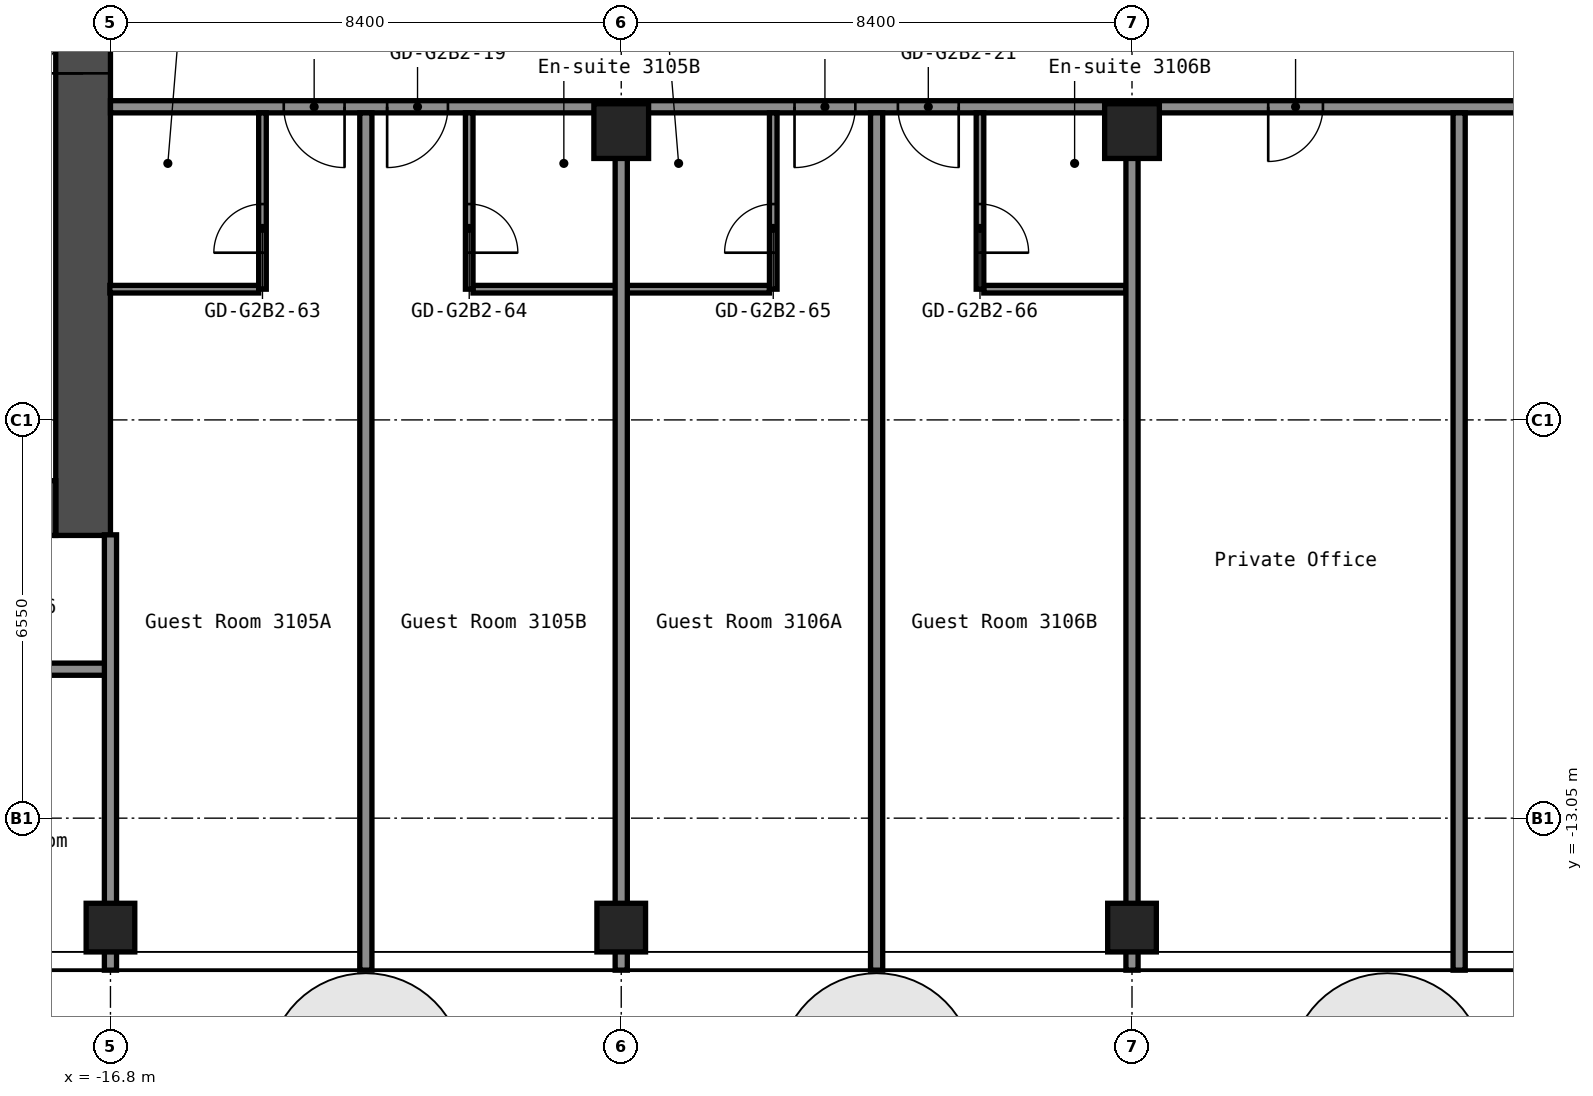
"""IFC4 building model, lengths in metres.
Left out: names, types, materials, properties, quantities, classifications, styles, units other than length and angle.
Written with IfcOpenShell. Run it as: python <this file> out.ifc"""

import sys

from ifc_helpers import new_model, si_unit, direction, frame, frame_2d, origin, origin_2d, place, context, subcontext, project, spatial, rectangle, hollow_rectangle, extrude, element, fill, save


model = new_model("IFC4")
c1 = context("Model", 3, precision=1e-05, world=origin(), true_north=direction((0.0, 1.0)))
c2 = subcontext(c1, "Body", "Model", "MODEL_VIEW")
j1 = project(units=[si_unit("LENGTHUNIT", "METRE"), si_unit("PLANEANGLEUNIT", "RADIAN")], contexts=[c1])
p1 = place(None, origin())
s1 = spatial("IfcSite", under=j1, at=p1, CompositionType="ELEMENT")
p2 = place(p1, origin())
s2 = spatial("IfcBuilding", under=s1, at=p2, CompositionType="ELEMENT")
p3 = place(p2, frame((0.0, 0.0, 110.6)))
s3 = spatial("IfcBuildingStorey", under=s2, at=p3, CompositionType="ELEMENT", Elevation=110.6)
for number, where, z_axis, x_axis in (
    (1, (-16.8, -14.85, 0.0), (0.0, 0.0, 1.0), (1.0, 0.0, 0.0)),
    (2, (-8.4, -14.85, 0.0), (0.0, 0.0, 1.0), (1.0, 0.0, 0.0)),
):
    element("IfcColumn", number, at=place(p3, frame(where, z_axis=z_axis, x_axis=x_axis)), inside=s3, PredefinedType="COLUMN", context=c2, shape_type="SweptSolid", body=[
        extrude(hollow_rectangle(XDim=0.8, YDim=0.8, WallThickness=0.032, at=origin_2d()), origin(), (0.0, 0.0, 1.0), 2.8),
    ])
p4 = place(p3, frame((-8.4, -1.75, 0.0), z_axis=(0.0, 0.0, 1.0), x_axis=(1.0, 0.0, 0.0)))
e3 = element("IfcColumn", 3, at=p4, inside=s3, PredefinedType="COLUMN", context=c2, shape_type="SweptSolid", body=[
    extrude(hollow_rectangle(XDim=0.9, YDim=0.9, WallThickness=0.036, at=origin_2d()), origin(), (0.0, 0.0, 1.0), 2.8),
])
p5 = place(p3, frame((0.0, -14.85, 0.0), z_axis=(0.0, 0.0, 1.0), x_axis=(1.0, 0.0, 0.0)))
e4 = element("IfcColumn", 4, at=p5, inside=s3, PredefinedType="COLUMN", context=c2, shape_type="SweptSolid", body=[
    extrude(hollow_rectangle(XDim=0.8, YDim=0.8, WallThickness=0.032, at=origin_2d()), origin(), (0.0, 0.0, 1.0), 2.8),
])
p6 = place(p3, frame((0.0, -1.75, 0.0), z_axis=(0.0, 0.0, 1.0), x_axis=(1.0, 0.0, 0.0)))
e5 = element("IfcColumn", 5, at=p6, inside=s3, PredefinedType="COLUMN", context=c2, shape_type="SweptSolid", body=[
    extrude(hollow_rectangle(XDim=0.9, YDim=0.9, WallThickness=0.036, at=origin_2d()), origin(), (0.0, 0.0, 1.0), 2.8),
])
p7 = place(p3, frame((-17.25, -8.4, 0.0), z_axis=(0.0, 0.0, 1.0), x_axis=(0.0, 1.0, 0.0)))
e6 = element("IfcWall", 6, at=p7, inside=s3, PredefinedType="SHEAR", context=c2, shape_type="SweptSolid", body=[
    extrude(rectangle(XDim=16.8, YDim=0.9, at=frame_2d((8.4, 0.0))), origin(), (0.0, 0.0, 1.0), 2.8),
])
p8 = place(p7, frame((7.6, 0.0, 0.0)))
e7 = element("IfcOpeningElement", 7, at=p8, cuts=e6, PredefinedType="OPENING", context=c2, shape_type="SweptSolid", body=[
    extrude(rectangle(XDim=1.2, YDim=2.1, at=frame_2d((0.6, 1.05))), frame((0.0, 0.46, 0.0), z_axis=(0.0, -1.0, 0.0), x_axis=(1.0, 0.0, 0.0)), (0.0, 0.0, 1.0), 0.92),
])
p9 = place(p3, frame((-32.7, -7.95, 0.0), z_axis=(0.0, 0.0, 1.0), x_axis=(1.0, 0.0, 0.0)))
e8 = element("IfcWall", 8, at=p9, inside=s3, PredefinedType="SHEAR", context=c2, shape_type="SweptSolid", body=[
    extrude(rectangle(XDim=15.0, YDim=0.9, at=frame_2d((7.5, 0.0))), origin(), (0.0, 0.0, 1.0), 2.8),
])
p10 = place(p9, frame((11.45, 0.0, 0.0)))
e9 = element("IfcOpeningElement", 9, at=p10, cuts=e8, PredefinedType="OPENING", context=c2, shape_type="SweptSolid", body=[
    extrude(rectangle(XDim=1.0, YDim=2.1, at=frame_2d((0.5, 1.05))), frame((0.0, 0.46, 0.0), z_axis=(0.0, -1.0, 0.0), x_axis=(1.0, 0.0, 0.0)), (0.0, 0.0, 1.0), 0.92),
])
p11 = place(p3, frame((-46.5, -10.6, 0.0), z_axis=(0.0, 0.0, 1.0), x_axis=(1.0, 0.0, 0.0)))
e10 = element("IfcWall", 10, at=p11, inside=s3, PredefinedType="PARTITIONING", context=c2, shape_type="SweptSolid", body=[
    extrude(rectangle(XDim=29.7, YDim=0.2, at=frame_2d((14.85, 0.0))), origin(), (0.0, 0.0, 1.0), 2.8),
])
p12 = place(p11, frame((1.95, 0.0, 0.0)))
e11 = element("IfcOpeningElement", 11, at=p12, cuts=e10, PredefinedType="OPENING", context=c2, shape_type="SweptSolid", body=[
    extrude(rectangle(XDim=0.9, YDim=2.1, at=frame_2d((0.45, 1.05))), frame((0.0, 0.11, 0.0), z_axis=(0.0, -1.0, 0.0), x_axis=(1.0, 0.0, 0.0)), (0.0, 0.0, 1.0), 0.22),
])
p13 = place(p11, frame((8.2, 0.0, 0.0)))
e12 = element("IfcOpeningElement", 12, at=p13, cuts=e10, PredefinedType="OPENING", context=c2, shape_type="SweptSolid", body=[
    extrude(rectangle(XDim=1.0, YDim=2.1, at=frame_2d((0.5, 1.05))), frame((0.0, 0.11, 0.0), z_axis=(0.0, -1.0, 0.0), x_axis=(1.0, 0.0, 0.0)), (0.0, 0.0, 1.0), 0.22),
])
p14 = place(p11, frame((13.96, 0.0, 0.0)))
e13 = element("IfcOpeningElement", 13, at=p14, cuts=e10, PredefinedType="OPENING", context=c2, shape_type="SweptSolid", body=[
    extrude(rectangle(XDim=0.9, YDim=2.1, at=frame_2d((0.45, 1.05))), frame((0.0, 0.11, 0.0), z_axis=(0.0, -1.0, 0.0), x_axis=(1.0, 0.0, 0.0)), (0.0, 0.0, 1.0), 0.22),
])
p15 = place(p11, frame((18.16, 0.0, 0.0)))
e14 = element("IfcOpeningElement", 14, at=p15, cuts=e10, PredefinedType="OPENING", context=c2, shape_type="SweptSolid", body=[
    extrude(rectangle(XDim=0.9, YDim=2.1, at=frame_2d((0.45, 1.05))), frame((0.0, 0.11, 0.0), z_axis=(0.0, -1.0, 0.0), x_axis=(1.0, 0.0, 0.0)), (0.0, 0.0, 1.0), 0.22),
])
p16 = place(p11, frame((23.2, 0.0, 0.0)))
e15 = element("IfcOpeningElement", 15, at=p16, cuts=e10, PredefinedType="OPENING", context=c2, shape_type="SweptSolid", body=[
    extrude(rectangle(XDim=0.9, YDim=2.1, at=frame_2d((0.45, 1.05))), frame((0.0, 0.11, 0.0), z_axis=(0.0, -1.0, 0.0), x_axis=(1.0, 0.0, 0.0)), (0.0, 0.0, 1.0), 0.22),
])
p17 = place(p11, frame((27.4, 0.0, 0.0)))
e16 = element("IfcOpeningElement", 16, at=p17, cuts=e10, PredefinedType="OPENING", context=c2, shape_type="SweptSolid", body=[
    extrude(rectangle(XDim=0.9, YDim=2.1, at=frame_2d((0.45, 1.05))), frame((0.0, 0.11, 0.0), z_axis=(0.0, -1.0, 0.0), x_axis=(1.0, 0.0, 0.0)), (0.0, 0.0, 1.0), 0.22),
])
p18 = place(p3, frame((-16.81, -4.35, 0.0), z_axis=(0.0, 0.0, 1.0), x_axis=(1.0, 0.0, 0.0)))
e17 = element("IfcWall", 17, at=p18, inside=s3, PredefinedType="PARTITIONING", context=c2, shape_type="SweptSolid", body=[
    extrude(rectangle(XDim=2.448, YDim=0.125, at=frame_2d((1.224, 0.0))), origin(), (0.0, 0.0, 1.0), 2.8),
])
p19 = place(p3, frame((-10.837, -4.35, 0.0), z_axis=(0.0, 0.0, 1.0), x_axis=(1.0, 0.0, 0.0)))
e18 = element("IfcWall", 18, at=p19, inside=s3, PredefinedType="PARTITIONING", context=c2, shape_type="SweptSolid", body=[
    extrude(rectangle(XDim=4.875, YDim=0.125, at=frame_2d((2.438, 0.0))), origin(), (0.0, 0.0, 1.0), 2.8),
])
p20 = place(p3, frame((-2.438, -4.35, 0.0), z_axis=(0.0, 0.0, 1.0), x_axis=(1.0, 0.0, 0.0)))
e19 = element("IfcWall", 19, at=p20, inside=s3, PredefinedType="PARTITIONING", context=c2, shape_type="SweptSolid", body=[
    extrude(rectangle(XDim=2.337, YDim=0.125, at=frame_2d((1.169, 0.0))), origin(), (0.0, 0.0, 1.0), 2.8),
])
p21 = place(p3, frame((-16.8, -1.35, 0.0), z_axis=(0.0, 0.0, 1.0), x_axis=(1.0, 0.0, 0.0)))
e20 = element("IfcWall", 20, at=p21, inside=s3, PredefinedType="PARTITIONING", context=c2, shape_type="SweptSolid", body=[
    extrude(rectangle(XDim=33.6, YDim=0.2, at=frame_2d((16.8, 0.0))), origin(), (0.0, 0.0, 1.0), 2.8),
])
p22 = place(p21, frame((2.85, 0.0, 0.0)))
e21 = element("IfcOpeningElement", 21, at=p22, cuts=e20, PredefinedType="OPENING", context=c2, shape_type="SweptSolid", body=[
    extrude(rectangle(XDim=1.0, YDim=2.1, at=frame_2d((0.5, 1.05))), frame((0.0, 0.11, 0.0), z_axis=(0.0, -1.0, 0.0), x_axis=(1.0, 0.0, 0.0)), (0.0, 0.0, 1.0), 0.22),
])
p23 = place(p21, frame((4.55, 0.0, 0.0)))
e22 = element("IfcOpeningElement", 22, at=p23, cuts=e20, PredefinedType="OPENING", context=c2, shape_type="SweptSolid", body=[
    extrude(rectangle(XDim=1.0, YDim=2.1, at=frame_2d((0.5, 1.05))), frame((0.0, 0.11, 0.0), z_axis=(0.0, -1.0, 0.0), x_axis=(1.0, 0.0, 0.0)), (0.0, 0.0, 1.0), 0.22),
])
p24 = place(p21, frame((11.25, 0.0, 0.0)))
e23 = element("IfcOpeningElement", 23, at=p24, cuts=e20, PredefinedType="OPENING", context=c2, shape_type="SweptSolid", body=[
    extrude(rectangle(XDim=1.0, YDim=2.1, at=frame_2d((0.5, 1.05))), frame((0.0, 0.11, 0.0), z_axis=(0.0, -1.0, 0.0), x_axis=(1.0, 0.0, 0.0)), (0.0, 0.0, 1.0), 0.22),
])
p25 = place(p21, frame((12.95, 0.0, 0.0)))
e24 = element("IfcOpeningElement", 24, at=p25, cuts=e20, PredefinedType="OPENING", context=c2, shape_type="SweptSolid", body=[
    extrude(rectangle(XDim=1.0, YDim=2.1, at=frame_2d((0.5, 1.05))), frame((0.0, 0.11, 0.0), z_axis=(0.0, -1.0, 0.0), x_axis=(1.0, 0.0, 0.0)), (0.0, 0.0, 1.0), 0.22),
])
p26 = place(p21, frame((19.04, 0.0, 0.0)))
e25 = element("IfcOpeningElement", 25, at=p26, cuts=e20, PredefinedType="OPENING", context=c2, shape_type="SweptSolid", body=[
    extrude(rectangle(XDim=0.9, YDim=2.1, at=frame_2d((0.45, 1.05))), frame((0.0, 0.11, 0.0), z_axis=(0.0, -1.0, 0.0), x_axis=(1.0, 0.0, 0.0)), (0.0, 0.0, 1.0), 0.22),
])
p27 = place(p21, frame((23.24, 0.0, 0.0)))
e26 = element("IfcOpeningElement", 26, at=p27, cuts=e20, PredefinedType="OPENING", context=c2, shape_type="SweptSolid", body=[
    extrude(rectangle(XDim=0.9, YDim=2.1, at=frame_2d((0.45, 1.05))), frame((0.0, 0.11, 0.0), z_axis=(0.0, -1.0, 0.0), x_axis=(1.0, 0.0, 0.0)), (0.0, 0.0, 1.0), 0.22),
])
p28 = place(p21, frame((28.05, 0.0, 0.0)))
e27 = element("IfcOpeningElement", 27, at=p28, cuts=e20, PredefinedType="OPENING", context=c2, shape_type="SweptSolid", body=[
    extrude(rectangle(XDim=1.0, YDim=2.1, at=frame_2d((0.5, 1.05))), frame((0.0, 0.11, 0.0), z_axis=(0.0, -1.0, 0.0), x_axis=(1.0, 0.0, 0.0)), (0.0, 0.0, 1.0), 0.22),
])
p29 = place(p21, frame((29.75, 0.0, 0.0)))
e28 = element("IfcOpeningElement", 28, at=p29, cuts=e20, PredefinedType="OPENING", context=c2, shape_type="SweptSolid", body=[
    extrude(rectangle(XDim=1.0, YDim=2.1, at=frame_2d((0.5, 1.05))), frame((0.0, 0.11, 0.0), z_axis=(0.0, -1.0, 0.0), x_axis=(1.0, 0.0, 0.0)), (0.0, 0.0, 1.0), 0.22),
])
p30 = place(p3, frame((-16.8, -15.55, 0.0), z_axis=(0.0, 0.0, 1.0), x_axis=(0.0, 1.0, 0.0)))
e29 = element("IfcWall", 29, at=p30, inside=s3, PredefinedType="PARTITIONING", context=c2, shape_type="SweptSolid", body=[
    extrude(rectangle(XDim=7.16, YDim=0.2, at=frame_2d((3.58, 0.0))), origin(), (0.0, 0.0, 1.0), 2.8),
])
p31 = place(p3, frame((-14.3, -4.35, 0.0), z_axis=(0.0, 0.0, 1.0), x_axis=(0.0, 1.0, 0.0)))
e30 = element("IfcWall", 30, at=p31, inside=s3, PredefinedType="PARTITIONING", context=c2, shape_type="SweptSolid", body=[
    extrude(rectangle(XDim=2.9, YDim=0.125, at=frame_2d((1.45, 0.0))), origin(), (0.0, 0.0, 1.0), 2.8),
])
p32 = place(p31, frame((0.6, 0.0, 0.0)))
e31 = element("IfcOpeningElement", 31, at=p32, cuts=e30, PredefinedType="OPENING", context=c2, shape_type="SweptSolid", body=[
    extrude(rectangle(XDim=0.8, YDim=2.1, at=frame_2d((0.4, 1.05))), frame((0.0, 0.073, 0.0), z_axis=(0.0, -1.0, 0.0), x_axis=(1.0, 0.0, 0.0)), (0.0, 0.0, 1.0), 0.145),
])
p33 = place(p3, frame((-12.6, -15.55, 0.0), z_axis=(0.0, 0.0, 1.0), x_axis=(0.0, 1.0, 0.0)))
e32 = element("IfcWall", 32, at=p33, inside=s3, PredefinedType="PARTITIONING", context=c2, shape_type="SweptSolid", body=[
    extrude(rectangle(XDim=14.1, YDim=0.2, at=frame_2d((7.05, 0.0))), origin(), (0.0, 0.0, 1.0), 2.8),
])
p34 = place(p3, frame((-10.9, -4.35, 0.0), z_axis=(0.0, 0.0, 1.0), x_axis=(0.0, 1.0, 0.0)))
e33 = element("IfcWall", 33, at=p34, inside=s3, PredefinedType="PARTITIONING", context=c2, shape_type="SweptSolid", body=[
    extrude(rectangle(XDim=2.9, YDim=0.125, at=frame_2d((1.45, 0.0))), origin(), (0.0, 0.0, 1.0), 2.8),
])
p35 = place(p34, frame((0.6, 0.0, 0.0)))
e34 = element("IfcOpeningElement", 34, at=p35, cuts=e33, PredefinedType="OPENING", context=c2, shape_type="SweptSolid", body=[
    extrude(rectangle(XDim=0.8, YDim=2.1, at=frame_2d((0.4, 1.05))), frame((0.0, 0.073, 0.0), z_axis=(0.0, -1.0, 0.0), x_axis=(1.0, 0.0, 0.0)), (0.0, 0.0, 1.0), 0.145),
])
p36 = place(p3, frame((-8.4, -15.55, 0.0), z_axis=(0.0, 0.0, 1.0), x_axis=(0.0, 1.0, 0.0)))
e35 = element("IfcWall", 35, at=p36, inside=s3, PredefinedType="PARTITIONING", context=c2, shape_type="SweptSolid", body=[
    extrude(rectangle(XDim=13.36, YDim=0.2, at=frame_2d((6.68, 0.0))), origin(), (0.0, 0.0, 1.0), 2.8),
])
p37 = place(p3, frame((-5.9, -4.35, 0.0), z_axis=(0.0, 0.0, 1.0), x_axis=(0.0, 1.0, 0.0)))
e36 = element("IfcWall", 36, at=p37, inside=s3, PredefinedType="PARTITIONING", context=c2, shape_type="SweptSolid", body=[
    extrude(rectangle(XDim=2.9, YDim=0.125, at=frame_2d((1.45, 0.0))), origin(), (0.0, 0.0, 1.0), 2.8),
])
p38 = place(p37, frame((0.6, 0.0, 0.0)))
e37 = element("IfcOpeningElement", 37, at=p38, cuts=e36, PredefinedType="OPENING", context=c2, shape_type="SweptSolid", body=[
    extrude(rectangle(XDim=0.8, YDim=2.1, at=frame_2d((0.4, 1.05))), frame((0.0, 0.073, 0.0), z_axis=(0.0, -1.0, 0.0), x_axis=(1.0, 0.0, 0.0)), (0.0, 0.0, 1.0), 0.145),
])
p39 = place(p3, frame((-4.2, -15.55, 0.0), z_axis=(0.0, 0.0, 1.0), x_axis=(0.0, 1.0, 0.0)))
e38 = element("IfcWall", 38, at=p39, inside=s3, PredefinedType="PARTITIONING", context=c2, shape_type="SweptSolid", body=[
    extrude(rectangle(XDim=14.1, YDim=0.2, at=frame_2d((7.05, 0.0))), origin(), (0.0, 0.0, 1.0), 2.8),
])
p40 = place(p3, frame((-2.5, -4.35, 0.0), z_axis=(0.0, 0.0, 1.0), x_axis=(0.0, 1.0, 0.0)))
e39 = element("IfcWall", 39, at=p40, inside=s3, PredefinedType="PARTITIONING", context=c2, shape_type="SweptSolid", body=[
    extrude(rectangle(XDim=2.9, YDim=0.125, at=frame_2d((1.45, 0.0))), origin(), (0.0, 0.0, 1.0), 2.8),
])
p41 = place(p40, frame((0.6, 0.0, 0.0)))
e40 = element("IfcOpeningElement", 40, at=p41, cuts=e39, PredefinedType="OPENING", context=c2, shape_type="SweptSolid", body=[
    extrude(rectangle(XDim=0.8, YDim=2.1, at=frame_2d((0.4, 1.05))), frame((0.0, 0.073, 0.0), z_axis=(0.0, -1.0, 0.0), x_axis=(1.0, 0.0, 0.0)), (0.0, 0.0, 1.0), 0.145),
])
p42 = place(p3, frame((0.0, -15.55, 0.0), z_axis=(0.0, 0.0, 1.0), x_axis=(0.0, 1.0, 0.0)))
e41 = element("IfcWall", 41, at=p42, inside=s3, PredefinedType="PARTITIONING", context=c2, shape_type="SweptSolid", body=[
    extrude(rectangle(XDim=13.36, YDim=0.2, at=frame_2d((6.68, 0.0))), origin(), (0.0, 0.0, 1.0), 2.8),
])
p43 = place(p3, frame((5.38, -15.55, 0.0), z_axis=(0.0, 0.0, 1.0), x_axis=(0.0, 1.0, 0.0)))
e42 = element("IfcWall", 42, at=p43, inside=s3, PredefinedType="PARTITIONING", context=c2, shape_type="SweptSolid", body=[
    extrude(rectangle(XDim=14.1, YDim=0.2, at=frame_2d((7.05, 0.0))), origin(), (0.0, 0.0, 1.0), 2.8),
])
p44 = place(p8, origin())
e43 = element("IfcDoor", 43, at=p44, inside=s3, OperationType="DOUBLE_DOOR_SINGLE_SWING", PredefinedType="DOOR", context=c2, shape_type="SweptSolid", body=[
    extrude(rectangle(XDim=1.2, YDim=2.1, at=frame_2d((0.6, 1.05))), frame((0.0, 0.025, 0.0), z_axis=(0.0, -1.0, 0.0), x_axis=(1.0, 0.0, 0.0)), (0.0, 0.0, 1.0), 0.05),
])
fill(e7, e43)
p45 = place(p22, origin())
e44 = element("IfcDoor", 44, at=p45, inside=s3, OperationType="SINGLE_SWING_RIGHT", PredefinedType="DOOR", context=c2, shape_type="SweptSolid", body=[
    extrude(rectangle(XDim=1.0, YDim=2.1, at=frame_2d((0.5, 1.05))), frame((0.0, 0.025, 0.0), z_axis=(0.0, -1.0, 0.0), x_axis=(1.0, 0.0, 0.0)), (0.0, 0.0, 1.0), 0.05),
])
fill(e21, e44)
p46 = place(p23, origin())
e45 = element("IfcDoor", 45, at=p46, inside=s3, OperationType="SINGLE_SWING_LEFT", PredefinedType="DOOR", context=c2, shape_type="SweptSolid", body=[
    extrude(rectangle(XDim=1.0, YDim=2.1, at=frame_2d((0.5, 1.05))), frame((0.0, 0.025, 0.0), z_axis=(0.0, -1.0, 0.0), x_axis=(1.0, 0.0, 0.0)), (0.0, 0.0, 1.0), 0.05),
])
fill(e22, e45)
p47 = place(p24, origin())
e46 = element("IfcDoor", 46, at=p47, inside=s3, OperationType="SINGLE_SWING_LEFT", PredefinedType="DOOR", context=c2, shape_type="SweptSolid", body=[
    extrude(rectangle(XDim=1.0, YDim=2.1, at=frame_2d((0.5, 1.05))), frame((0.0, 0.025, 0.0), z_axis=(0.0, -1.0, 0.0), x_axis=(1.0, 0.0, 0.0)), (0.0, 0.0, 1.0), 0.05),
])
fill(e23, e46)
p48 = place(p25, origin())
e47 = element("IfcDoor", 47, at=p48, inside=s3, OperationType="SINGLE_SWING_RIGHT", PredefinedType="DOOR", context=c2, shape_type="SweptSolid", body=[
    extrude(rectangle(XDim=1.0, YDim=2.1, at=frame_2d((0.5, 1.05))), frame((0.0, 0.025, 0.0), z_axis=(0.0, -1.0, 0.0), x_axis=(1.0, 0.0, 0.0)), (0.0, 0.0, 1.0), 0.05),
])
fill(e24, e47)
p49 = place(p26, origin())
e48 = element("IfcDoor", 48, at=p49, inside=s3, OperationType="SINGLE_SWING_LEFT", PredefinedType="DOOR", context=c2, shape_type="SweptSolid", body=[
    extrude(rectangle(XDim=0.9, YDim=2.1, at=frame_2d((0.45, 1.05))), frame((0.0, 0.025, 0.0), z_axis=(0.0, -1.0, 0.0), x_axis=(1.0, 0.0, 0.0)), (0.0, 0.0, 1.0), 0.05),
])
fill(e25, e48)
p50 = place(p32, origin())
e49 = element("IfcDoor", 49, at=p50, inside=s3, OperationType="SINGLE_SWING_RIGHT", PredefinedType="DOOR", context=c2, shape_type="SweptSolid", body=[
    extrude(rectangle(XDim=0.8, YDim=2.1, at=frame_2d((0.4, 1.05))), frame((0.0, 0.025, 0.0), z_axis=(0.0, -1.0, 0.0), x_axis=(1.0, 0.0, 0.0)), (0.0, 0.0, 1.0), 0.05),
])
fill(e31, e49)
p51 = place(p35, origin())
e50 = element("IfcDoor", 50, at=p51, inside=s3, OperationType="SINGLE_SWING_LEFT", PredefinedType="DOOR", context=c2, shape_type="SweptSolid", body=[
    extrude(rectangle(XDim=0.8, YDim=2.1, at=frame_2d((0.4, 1.05))), frame((0.0, 0.025, 0.0), z_axis=(0.0, -1.0, 0.0), x_axis=(1.0, 0.0, 0.0)), (0.0, 0.0, 1.0), 0.05),
])
fill(e34, e50)
p52 = place(p38, origin())
e51 = element("IfcDoor", 51, at=p52, inside=s3, OperationType="SINGLE_SWING_RIGHT", PredefinedType="DOOR", context=c2, shape_type="SweptSolid", body=[
    extrude(rectangle(XDim=0.8, YDim=2.1, at=frame_2d((0.4, 1.05))), frame((0.0, 0.025, 0.0), z_axis=(0.0, -1.0, 0.0), x_axis=(1.0, 0.0, 0.0)), (0.0, 0.0, 1.0), 0.05),
])
fill(e37, e51)
p53 = place(p41, origin())
e52 = element("IfcDoor", 52, at=p53, inside=s3, OperationType="SINGLE_SWING_LEFT", PredefinedType="DOOR", context=c2, shape_type="SweptSolid", body=[
    extrude(rectangle(XDim=0.8, YDim=2.1, at=frame_2d((0.4, 1.05))), frame((0.0, 0.025, 0.0), z_axis=(0.0, -1.0, 0.0), x_axis=(1.0, 0.0, 0.0)), (0.0, 0.0, 1.0), 0.05),
])
fill(e40, e52)
save(model, sys.argv[1])
